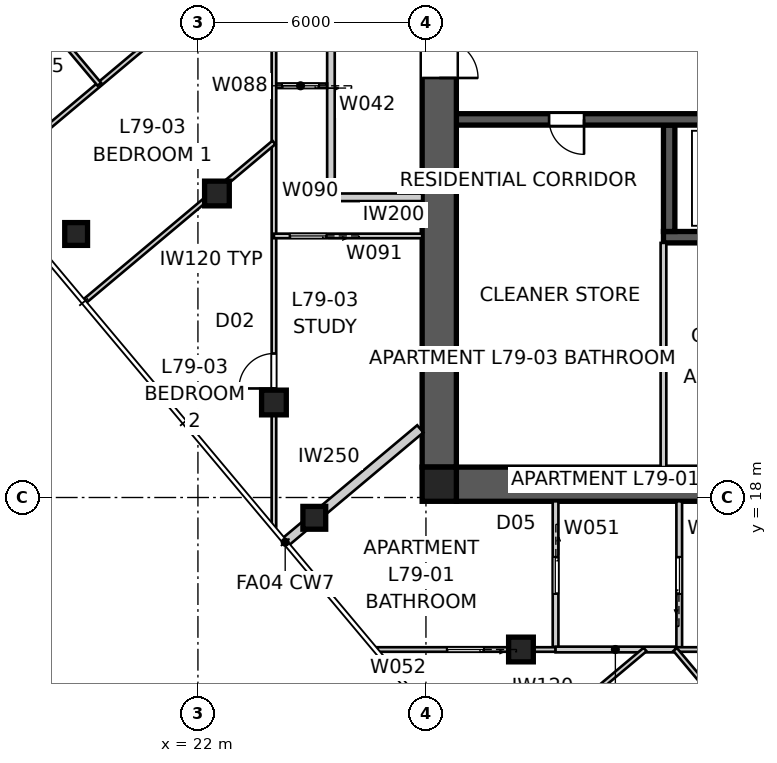
"""IFC4 building model, lengths in metres.
Left out: names, types, materials, properties, quantities, classifications, styles, units other than length and angle.
Written with IfcOpenShell. Run it as: python <this file> out.ifc"""

import sys

from ifc_helpers import new_model, si_unit, direction, frame, frame_2d, origin, origin_2d, place, context, subcontext, project, spatial, polyline, rectangle, outline, extrude, element, fill, save


model = new_model("IFC4")
c1 = context("Model", 3, precision=1e-05, world=origin(), true_north=direction((0.0, 1.0)))
c2 = subcontext(c1, "Body", "Model", "MODEL_VIEW")
j1 = project(units=[si_unit("LENGTHUNIT", "METRE"), si_unit("PLANEANGLEUNIT", "RADIAN")], contexts=[c1])
p1 = place(None, origin())
s1 = spatial("IfcSite", under=j1, at=p1, CompositionType="ELEMENT")
p2 = place(p1, origin())
s2 = spatial("IfcBuilding", under=s1, at=p2, CompositionType="ELEMENT")
p3 = place(p2, frame((0.0, 0.0, 286.2)))
s3 = spatial("IfcBuildingStorey", under=s2, at=p3, CompositionType="ELEMENT", Elevation=286.2)
p4 = place(p3, frame((51.2, 18.35, 0.0), z_axis=(0.0, 0.0, 1.0), x_axis=(-1.0, 0.0, 0.0)))
e1 = element("IfcWall", 1, at=p4, inside=s3, PredefinedType="SHEAR", context=c2, shape_type="SweptSolid", body=[
    extrude(outline(polyline([(0.0, -0.45), (22.4, -0.45), (22.4, -0.025), (22.85, -0.025), (22.85, 0.025), (22.4, 0.025), (22.4, 0.45), (0.0, 0.45), (0.0, 0.025), (-0.45, 0.025), (-0.45, -0.025), (0.0, -0.025), (0.0, -0.45)])), origin(), (0.0, 0.0, 1.0), 3.4),
])
p5 = place(p3, frame((28.35, 41.2, 0.0), z_axis=(0.0, 0.0, 1.0), x_axis=(0.0, -1.0, 0.0)))
e2 = element("IfcWall", 2, at=p5, inside=s3, PredefinedType="SHEAR", context=c2, shape_type="SweptSolid", body=[
    extrude(outline(polyline([(0.0, -0.45), (22.4, -0.45), (22.4, -0.025), (22.85, -0.025), (22.85, 0.025), (22.4, 0.025), (22.4, 0.45), (0.0, 0.45), (0.0, 0.025), (-0.45, 0.025), (-0.45, -0.025), (0.0, -0.025), (0.0, -0.45)])), origin(), (0.0, 0.0, 1.0), 3.4),
])
p6 = place(p5, frame((11.14, 0.0, 0.0)))
e3 = element("IfcOpeningElement", 3, at=p6, cuts=e2, PredefinedType="OPENING", context=c2, shape_type="SweptSolid", body=[
    extrude(rectangle(XDim=1.02, YDim=2.4, at=frame_2d((0.51, 1.2))), frame((0.0, 0.46, 0.0), z_axis=(0.0, -1.0, 0.0), x_axis=(1.0, 0.0, 0.0)), (0.0, 0.0, 1.0), 0.92),
])
p7 = place(p3, frame((51.2, 27.95, 0.0), z_axis=(0.0, 0.0, 1.0), x_axis=(-1.0, 0.0, 0.0)))
e4 = element("IfcWall", 4, at=p7, inside=s3, PredefinedType="SHEAR", context=c2, shape_type="SweptSolid", body=[
    extrude(rectangle(XDim=22.4, YDim=0.3, at=frame_2d((11.2, 0.0))), origin(), (0.0, 0.0, 1.0), 3.4),
])
p8 = place(p7, frame((19.04, 0.0, 0.0)))
e5 = element("IfcOpeningElement", 5, at=p8, cuts=e4, PredefinedType="OPENING", context=c2, shape_type="SweptSolid", body=[
    extrude(rectangle(XDim=0.92, YDim=2.1, at=frame_2d((0.46, 1.05))), frame((0.0, 0.16, 0.0), z_axis=(0.0, -1.0, 0.0), x_axis=(1.0, 0.0, 0.0)), (0.0, 0.0, 1.0), 0.32),
])
p9 = place(p7, frame((1.265, 0.0, 0.0)))
e6 = element("IfcOpeningElement", 6, at=p9, cuts=e4, PredefinedType="OPENING", context=c2, shape_type="SweptSolid", body=[
    extrude(rectangle(XDim=1.02, YDim=2.1, at=frame_2d((0.51, 1.05))), frame((0.0, 0.16, 0.0), z_axis=(0.0, -1.0, 0.0), x_axis=(1.0, 0.0, 0.0)), (0.0, 0.0, 1.0), 0.32),
])
p10 = place(p7, frame((4.015, 0.0, 0.0)))
e7 = element("IfcOpeningElement", 7, at=p10, cuts=e4, PredefinedType="OPENING", context=c2, shape_type="SweptSolid", body=[
    extrude(rectangle(XDim=0.92, YDim=2.1, at=frame_2d((0.46, 1.05))), frame((0.0, 0.16, 0.0), z_axis=(0.0, -1.0, 0.0), x_axis=(1.0, 0.0, 0.0)), (0.0, 0.0, 1.0), 0.32),
])
p11 = place(p7, frame((9.34, 0.0, 0.0)))
e8 = element("IfcOpeningElement", 8, at=p11, cuts=e4, PredefinedType="OPENING", context=c2, shape_type="SweptSolid", body=[
    extrude(rectangle(XDim=0.92, YDim=2.1, at=frame_2d((0.46, 1.05))), frame((0.0, 0.16, 0.0), z_axis=(0.0, -1.0, 0.0), x_axis=(1.0, 0.0, 0.0)), (0.0, 0.0, 1.0), 0.32),
])
p12 = place(p7, frame((7.015, 0.0, 0.0)))
e9 = element("IfcOpeningElement", 9, at=p12, cuts=e4, PredefinedType="OPENING", context=c2, shape_type="SweptSolid", body=[
    extrude(rectangle(XDim=0.92, YDim=2.1, at=frame_2d((0.46, 1.05))), frame((0.0, 0.16, 0.0), z_axis=(0.0, -1.0, 0.0), x_axis=(1.0, 0.0, 0.0)), (0.0, 0.0, 1.0), 0.32),
])
p13 = place(p7, frame((12.05, 0.0, 0.0)))
e10 = element("IfcOpeningElement", 10, at=p13, cuts=e4, PredefinedType="OPENING", context=c2, shape_type="SweptSolid", body=[
    extrude(rectangle(XDim=1.1, YDim=2.1, at=frame_2d((0.55, 1.05))), frame((0.0, 0.16, 0.0), z_axis=(0.0, -1.0, 0.0), x_axis=(1.0, 0.0, 0.0)), (0.0, 0.0, 1.0), 0.32),
])
p14 = place(p7, frame((14.85, 0.0, 0.0)))
e11 = element("IfcOpeningElement", 11, at=p14, cuts=e4, PredefinedType="OPENING", context=c2, shape_type="SweptSolid", body=[
    extrude(rectangle(XDim=1.1, YDim=2.1, at=frame_2d((0.55, 1.05))), frame((0.0, 0.16, 0.0), z_axis=(0.0, -1.0, 0.0), x_axis=(1.0, 0.0, 0.0)), (0.0, 0.0, 1.0), 0.32),
])
p15 = place(p3, frame((45.75, 24.85, 0.0), z_axis=(0.0, 0.0, 1.0), x_axis=(-1.0, 0.0, 0.0)))
e12 = element("IfcWall", 12, at=p15, inside=s3, PredefinedType="SHEAR", context=c2, shape_type="SweptSolid", body=[
    extrude(rectangle(XDim=11.5, YDim=0.3, at=frame_2d((5.75, 0.0))), origin(), (0.0, 0.0, 1.0), 3.4),
])
p16 = place(p3, frame((34.4, 27.8, 0.0), z_axis=(0.0, 0.0, 1.0), x_axis=(0.0, -1.0, 0.0)))
e13 = element("IfcWall", 13, at=p16, inside=s3, PredefinedType="SHEAR", context=c2, shape_type="SweptSolid", body=[
    extrude(rectangle(XDim=2.8, YDim=0.3, at=frame_2d((1.4, 0.0))), origin(), (0.0, 0.0, 1.0), 3.4),
])
p17 = place(p3, frame((28.35, 18.35, 0.0), z_axis=(0.0, 0.0, 1.0), x_axis=(1.0, 0.0, 0.0)))
e14 = element("IfcColumn", 14, at=p17, inside=s3, PredefinedType="COLUMN", context=c2, shape_type="SweptSolid", body=[
    extrude(rectangle(XDim=0.9, YDim=0.9, at=origin_2d()), origin(), (0.0, 0.0, 1.0), 3.4),
])
for number, where, z_axis, x_axis in (
    (15, (18.795, 24.935, 0.0), (0.0, 0.0, 1.0), (1.0, 0.0, 0.0)),
    (16, (25.062, 17.466, 0.0), (0.0, 0.0, 1.0), (1.0, 0.0, 0.0)),
):
    element("IfcColumn", number, at=place(p3, frame(where, z_axis=z_axis, x_axis=x_axis)), inside=s3, PredefinedType="COLUMN", context=c2, shape_type="SweptSolid", body=[
        extrude(rectangle(XDim=0.6, YDim=0.6, at=origin_2d()), origin(), (0.0, 0.0, 1.0), 3.4),
    ])
for number, where, z_axis, x_axis in (
    (17, (22.5, 26.0, 0.0), (0.0, 0.0, 1.0), (1.0, 0.0, 0.0)),
    (18, (24.0, 20.5, 0.0), (0.0, 0.0, 1.0), (1.0, 0.0, 0.0)),
    (19, (30.5, 14.0, 0.0), (0.0, 0.0, 1.0), (1.0, 0.0, 0.0)),
):
    element("IfcColumn", number, at=place(p3, frame(where, z_axis=z_axis, x_axis=x_axis)), inside=s3, PredefinedType="COLUMN", context=c2, shape_type="SweptSolid", body=[
        extrude(rectangle(XDim=0.65, YDim=0.65, at=origin_2d()), origin(), (0.0, 0.0, 1.0), 3.4),
    ])
p18 = place(p3, frame((25.5, 25.9, 0.0), z_axis=(0.0, 0.0, 1.0), x_axis=(0.0, 1.0, 0.0)))
e20 = element("IfcWall", 20, at=p18, inside=s3, PredefinedType="PARTITIONING", context=c2, shape_type="SweptSolid", body=[
    extrude(rectangle(XDim=8.2, YDim=0.2, at=frame_2d((4.1, 0.0))), origin(), (0.0, 0.0, 1.0), 3.25),
])
p19 = place(p18, frame((4.882, 0.0, 0.0)))
e21 = element("IfcOpeningElement", 21, at=p19, cuts=e20, PredefinedType="OPENING", context=c2, shape_type="SweptSolid", body=[
    extrude(rectangle(XDim=1.02, YDim=2.34, at=frame_2d((0.51, 1.17))), frame((0.0, 0.11, 0.0), z_axis=(0.0, -1.0, 0.0), x_axis=(1.0, 0.0, 0.0)), (0.0, 0.0, 1.0), 0.22),
])
p20 = place(p3, frame((27.9, 25.9, 0.0), z_axis=(0.0, 0.0, 1.0), x_axis=(-1.0, 0.0, 0.0)))
e22 = element("IfcWall", 22, at=p20, inside=s3, PredefinedType="PARTITIONING", context=c2, shape_type="SweptSolid", body=[
    extrude(rectangle(XDim=2.5, YDim=0.2, at=frame_2d((1.25, 0.0))), origin(), (0.0, 0.0, 1.0), 3.25),
])
p21 = place(p3, frame((24.296, 16.823, 0.0), z_axis=(0.0, 0.0, 1.0), x_axis=(0.76603440109, 0.64279957712, 0.0)))
e23 = element("IfcWall", 23, at=p21, inside=s3, PredefinedType="PARTITIONING", context=c2, shape_type="SweptSolid", body=[
    extrude(rectangle(XDim=4.64, YDim=0.25, at=frame_2d((2.32, 0.0))), origin(), (0.0, 0.0, 1.0), 3.25),
])
p22 = place(p3, frame((34.25, 18.8, 0.0), z_axis=(0.0, 0.0, 1.0), x_axis=(0.0, 1.0, 0.0)))
e24 = element("IfcWall", 24, at=p22, inside=s3, PredefinedType="SOLIDWALL", context=c2, shape_type="SweptSolid", body=[
    extrude(rectangle(XDim=5.9, YDim=0.15, at=frame_2d((2.95, 0.0))), origin(), (0.0, 0.0, 1.0), 3.25),
])
p23 = place(p3, frame((31.41, 17.9, 0.0), z_axis=(0.0, 0.0, 1.0), x_axis=(0.0, -1.0, 0.0)))
e25 = element("IfcWall", 25, at=p23, inside=s3, PredefinedType="SOLIDWALL", context=c2, shape_type="SweptSolid", body=[
    extrude(rectangle(XDim=3.9, YDim=0.15, at=frame_2d((1.95, 0.0))), origin(), (0.0, 0.0, 1.0), 3.25),
])
p24 = place(p23, frame((1.47, 0.0, 0.0)))
e26 = element("IfcOpeningElement", 26, at=p24, cuts=e25, PredefinedType="OPENING", context=c2, shape_type="SweptSolid", body=[
    extrude(rectangle(XDim=0.96, YDim=2.1, at=frame_2d((0.48, 1.05))), frame((0.0, 0.085, 0.0), z_axis=(0.0, -1.0, 0.0), x_axis=(1.0, 0.0, 0.0)), (0.0, 0.0, 1.0), 0.17),
])
p25 = place(p3, frame((31.41, 14.0, 0.0), z_axis=(0.0, 0.0, 1.0), x_axis=(-1.0, 0.0, 0.0)))
e27 = element("IfcWall", 27, at=p25, inside=s3, PredefinedType="PARTITIONING", context=c2, shape_type="SweptSolid", body=[
    extrude(rectangle(XDim=4.693, YDim=0.12, at=frame_2d((2.347, 0.0))), origin(), (0.0, 0.0, 1.0), 2.55),
])
p26 = place(p25, frame((1.893, 0.0, 0.0)))
e28 = element("IfcOpeningElement", 28, at=p26, cuts=e27, PredefinedType="OPENING", context=c2, shape_type="SweptSolid", body=[
    extrude(rectangle(XDim=0.96, YDim=2.1, at=frame_2d((0.48, 1.05))), frame((0.0, 0.07, 0.0), z_axis=(0.0, -1.0, 0.0), x_axis=(1.0, 0.0, 0.0)), (0.0, 0.0, 1.0), 0.14),
])
p27 = place(p3, frame((34.665, 14.0, 0.0), z_axis=(0.0, 0.0, 1.0), x_axis=(0.0, 1.0, 0.0)))
e29 = element("IfcWall", 29, at=p27, inside=s3, PredefinedType="SOLIDWALL", context=c2, shape_type="SweptSolid", body=[
    extrude(rectangle(XDim=3.9, YDim=0.15, at=frame_2d((1.95, 0.0))), origin(), (0.0, 0.0, 1.0), 3.25),
])
p28 = place(p27, frame((1.47, 0.0, 0.0)))
e30 = element("IfcOpeningElement", 30, at=p28, cuts=e29, PredefinedType="OPENING", context=c2, shape_type="SweptSolid", body=[
    extrude(rectangle(XDim=0.96, YDim=2.1, at=frame_2d((0.48, 1.05))), frame((0.0, 0.085, 0.0), z_axis=(0.0, -1.0, 0.0), x_axis=(1.0, 0.0, 0.0)), (0.0, 0.0, 1.0), 0.17),
])
p29 = place(p3, frame((51.625, 14.0, 0.0), z_axis=(0.0, 0.0, 1.0), x_axis=(-1.0, 0.0, 0.0)))
e31 = element("IfcWall", 31, at=p29, inside=s3, PredefinedType="PARTITIONING", context=c2, shape_type="SweptSolid", body=[
    extrude(rectangle(XDim=17.067, YDim=0.12, at=frame_2d((8.533, 0.0))), origin(), (0.0, 0.0, 1.0), 2.55),
])
p30 = place(p29, frame((2.702, 0.0, 0.0)))
e32 = element("IfcOpeningElement", 32, at=p30, cuts=e31, PredefinedType="OPENING", context=c2, shape_type="SweptSolid", body=[
    extrude(rectangle(XDim=0.92, YDim=2.34, at=frame_2d((0.46, 1.17))), frame((0.0, 0.07, 0.0), z_axis=(0.0, -1.0, 0.0), x_axis=(1.0, 0.0, 0.0)), (0.0, 0.0, 1.0), 0.14),
])
p31 = place(p29, frame((11.4, 0.0, 0.0)))
e33 = element("IfcOpeningElement", 33, at=p31, cuts=e31, PredefinedType="OPENING", context=c2, shape_type="SweptSolid", body=[
    extrude(rectangle(XDim=0.92, YDim=2.34, at=frame_2d((0.46, 1.17))), frame((0.0, 0.07, 0.0), z_axis=(0.0, -1.0, 0.0), x_axis=(1.0, 0.0, 0.0)), (0.0, 0.0, 1.0), 0.14),
])
p32 = place(p29, frame((14.544, 0.0, 0.0)))
e34 = element("IfcOpeningElement", 34, at=p32, cuts=e31, PredefinedType="OPENING", context=c2, shape_type="SweptSolid", body=[
    extrude(rectangle(XDim=0.96, YDim=2.1, at=frame_2d((0.48, 1.05))), frame((0.0, 0.07, 0.0), z_axis=(0.0, -1.0, 0.0), x_axis=(1.0, 0.0, 0.0)), (0.0, 0.0, 1.0), 0.14),
])
p33 = place(p3, frame((34.558, 14.0, 0.0), z_axis=(0.0, 0.0, 1.0), x_axis=(-1.0, 0.0, 0.0)))
e35 = element("IfcWall", 35, at=p33, inside=s3, PredefinedType="SOLIDWALL", context=c2, shape_type="SweptSolid", body=[
    extrude(rectangle(XDim=3.147, YDim=0.15, at=frame_2d((1.574, 0.0))), origin(), (0.0, 0.0, 1.0), 3.25),
])
p34 = place(p3, frame((34.558, 14.0, 0.0), z_axis=(0.0, 0.0, 1.0), x_axis=(0.642782931909, -0.766048368216, 0.0)))
e36 = element("IfcWall", 36, at=p34, inside=s3, PredefinedType="PARTITIONING", context=c2, shape_type="SweptSolid", body=[
    extrude(rectangle(XDim=11.701, YDim=0.12, at=frame_2d((5.851, 0.0))), origin(), (0.0, 0.0, 1.0), 3.25),
])
p35 = place(p34, frame((5.411, 0.0, 0.0)))
e37 = element("IfcOpeningElement", 37, at=p35, cuts=e36, PredefinedType="OPENING", context=c2, shape_type="SweptSolid", body=[
    extrude(rectangle(XDim=0.92, YDim=2.34, at=frame_2d((0.46, 1.17))), frame((0.0, 0.07, 0.0), z_axis=(0.0, -1.0, 0.0), x_axis=(1.0, 0.0, 0.0)), (0.0, 0.0, 1.0), 0.14),
])
p36 = place(p3, frame((29.63, 10.529, 0.0), z_axis=(0.0, 0.0, 1.0), x_axis=(0.766034275706, 0.642799726543, 0.0)))
e38 = element("IfcWall", 38, at=p36, inside=s3, PredefinedType="PARTITIONING", context=c2, shape_type="SweptSolid", body=[
    extrude(rectangle(XDim=5.4, YDim=0.12, at=frame_2d((2.7, 0.0))), origin(), (0.0, 0.0, 1.0), 3.25),
])
p37 = place(p3, frame((25.4, 28.834, 0.0), z_axis=(0.0, 0.0, 1.0), x_axis=(-1.0, 0.0, 0.0)))
e39 = element("IfcWall", 39, at=p37, inside=s3, PredefinedType="PARTITIONING", context=c2, shape_type="SweptSolid", body=[
    extrude(rectangle(XDim=1.4, YDim=0.12, at=frame_2d((0.7, 0.0))), origin(), (0.0, 0.0, 1.0), 3.25),
])
p38 = place(p37, frame((0.22, 0.0, 0.0)))
e40 = element("IfcOpeningElement", 40, at=p38, cuts=e39, PredefinedType="OPENING", context=c2, shape_type="SweptSolid", body=[
    extrude(rectangle(XDim=0.96, YDim=2.1, at=frame_2d((0.48, 1.05))), frame((0.0, 0.07, 0.0), z_axis=(0.0, -1.0, 0.0), x_axis=(1.0, 0.0, 0.0)), (0.0, 0.0, 1.0), 0.14),
])
p39 = place(p3, frame((24.0, 17.238, 0.0), z_axis=(0.0, 0.0, 1.0), x_axis=(0.0, 1.0, 0.0)))
e41 = element("IfcWall", 41, at=p39, inside=s3, PredefinedType="PARTITIONING", context=c2, shape_type="SweptSolid", body=[
    extrude(rectangle(XDim=26.045, YDim=0.12, at=frame_2d((13.022, 0.0))), origin(), (0.0, 0.0, 1.0), 2.55),
])
p40 = place(p39, frame((13.116, 0.0, 0.0)))
e42 = element("IfcOpeningElement", 42, at=p40, cuts=e41, PredefinedType="OPENING", context=c2, shape_type="SweptSolid", body=[
    extrude(rectangle(XDim=0.92, YDim=2.34, at=frame_2d((0.46, 1.17))), frame((0.0, 0.07, 0.0), z_axis=(0.0, -1.0, 0.0), x_axis=(1.0, 0.0, 0.0)), (0.0, 0.0, 1.0), 0.14),
])
p41 = place(p39, frame((15.705, 0.0, 0.0)))
e43 = element("IfcOpeningElement", 43, at=p41, cuts=e41, PredefinedType="OPENING", context=c2, shape_type="SweptSolid", body=[
    extrude(rectangle(XDim=0.92, YDim=2.34, at=frame_2d((0.46, 1.17))), frame((0.0, 0.07, 0.0), z_axis=(0.0, -1.0, 0.0), x_axis=(1.0, 0.0, 0.0)), (0.0, 0.0, 1.0), 0.14),
])
p42 = place(p39, frame((20.191, 0.0, 0.0)))
e44 = element("IfcOpeningElement", 44, at=p42, cuts=e41, PredefinedType="OPENING", context=c2, shape_type="SweptSolid", body=[
    extrude(rectangle(XDim=0.96, YDim=2.1, at=frame_2d((0.48, 1.05))), frame((0.0, 0.07, 0.0), z_axis=(0.0, -1.0, 0.0), x_axis=(1.0, 0.0, 0.0)), (0.0, 0.0, 1.0), 0.14),
])
p43 = place(p39, frame((3.631, 0.0, 0.0)))
e45 = element("IfcOpeningElement", 45, at=p43, cuts=e41, PredefinedType="OPENING", context=c2, shape_type="SweptSolid", body=[
    extrude(rectangle(XDim=0.92, YDim=2.34, at=frame_2d((0.46, 1.17))), frame((0.0, 0.07, 0.0), z_axis=(0.0, -1.0, 0.0), x_axis=(1.0, 0.0, 0.0)), (0.0, 0.0, 1.0), 0.14),
])
p44 = place(p3, frame((27.9, 24.883, 0.0), z_axis=(0.0, 0.0, 1.0), x_axis=(-1.0, 0.0, 0.0)))
e46 = element("IfcWall", 46, at=p44, inside=s3, PredefinedType="PARTITIONING", context=c2, shape_type="SweptSolid", body=[
    extrude(rectangle(XDim=3.9, YDim=0.12, at=frame_2d((1.95, 0.0))), origin(), (0.0, 0.0, 1.0), 3.25),
])
p45 = place(p44, frame((2.52, 0.0, 0.0)))
e47 = element("IfcOpeningElement", 47, at=p45, cuts=e46, PredefinedType="OPENING", context=c2, shape_type="SweptSolid", body=[
    extrude(rectangle(XDim=0.96, YDim=2.1, at=frame_2d((0.48, 1.05))), frame((0.0, 0.07, 0.0), z_axis=(0.0, -1.0, 0.0), x_axis=(1.0, 0.0, 0.0)), (0.0, 0.0, 1.0), 0.14),
])
p46 = place(p3, frame((24.0, 32.729, 0.0), z_axis=(0.0, 0.0, 1.0), x_axis=(-0.766044319693, -0.64278775678, 0.0)))
e48 = element("IfcWall", 48, at=p46, inside=s3, PredefinedType="PARTITIONING", context=c2, shape_type="SweptSolid", body=[
    extrude(rectangle(XDim=9.957, YDim=0.12, at=frame_2d((4.979, 0.0))), origin(), (0.0, 0.0, 1.0), 3.25),
])
p47 = place(p3, frame((19.406, 28.874, 0.0), z_axis=(0.0, 0.0, 1.0), x_axis=(-0.642767300664, 0.766061483953, 0.0)))
e49 = element("IfcWall", 49, at=p47, inside=s3, PredefinedType="PARTITIONING", context=c2, shape_type="SweptSolid", body=[
    extrude(rectangle(XDim=4.085, YDim=0.12, at=frame_2d((2.042, 0.0))), origin(), (0.0, 0.0, 1.0), 3.25),
])
p48 = place(p47, frame((2.853, 0.0, 0.0)))
e50 = element("IfcOpeningElement", 50, at=p48, cuts=e49, PredefinedType="OPENING", context=c2, shape_type="SweptSolid", body=[
    extrude(rectangle(XDim=0.92, YDim=2.34, at=frame_2d((0.46, 1.17))), frame((0.0, 0.07, 0.0), z_axis=(0.0, -1.0, 0.0), x_axis=(1.0, 0.0, 0.0)), (0.0, 0.0, 1.0), 0.14),
])
p49 = place(p3, frame((24.0, 27.344, 0.0), z_axis=(0.0, 0.0, 1.0), x_axis=(-0.766051249233, -0.642779498388, 0.0)))
e51 = element("IfcWall", 51, at=p49, inside=s3, PredefinedType="PARTITIONING", context=c2, shape_type="SweptSolid", body=[
    extrude(rectangle(XDim=6.496, YDim=0.12, at=frame_2d((3.248, 0.0))), origin(), (0.0, 0.0, 1.0), 3.25),
])
p50 = place(p8, origin())
e52 = element("IfcDoor", 52, at=p50, inside=s3, OperationType="SINGLE_SWING_LEFT", PredefinedType="DOOR", context=c2, shape_type="SweptSolid", body=[
    extrude(rectangle(XDim=0.92, YDim=2.1, at=frame_2d((0.46, 1.05))), frame((0.0, 0.025, 0.0), z_axis=(0.0, -1.0, 0.0), x_axis=(1.0, 0.0, 0.0)), (0.0, 0.0, 1.0), 0.05),
])
fill(e5, e52)
p51 = place(p38, origin())
e53 = element("IfcDoor", 53, at=p51, inside=s3, OperationType="SLIDING_TO_LEFT", PredefinedType="DOOR", context=c2, shape_type="SweptSolid", body=[
    extrude(rectangle(XDim=0.96, YDim=2.1, at=frame_2d((0.48, 1.05))), frame((0.0, 0.025, 0.0), z_axis=(0.0, -1.0, 0.0), x_axis=(1.0, 0.0, 0.0)), (0.0, 0.0, 1.0), 0.05),
])
fill(e40, e53)
p52 = place(p45, origin())
e54 = element("IfcDoor", 54, at=p52, inside=s3, OperationType="SLIDING_TO_LEFT", PredefinedType="DOOR", context=c2, shape_type="SweptSolid", body=[
    extrude(rectangle(XDim=0.96, YDim=2.1, at=frame_2d((0.48, 1.05))), frame((0.0, 0.025, 0.0), z_axis=(0.0, -1.0, 0.0), x_axis=(1.0, 0.0, 0.0)), (0.0, 0.0, 1.0), 0.05),
])
fill(e47, e54)
p53 = place(p43, origin())
e55 = element("IfcDoor", 55, at=p53, inside=s3, OperationType="SINGLE_SWING_LEFT", PredefinedType="DOOR", context=c2, shape_type="SweptSolid", body=[
    extrude(rectangle(XDim=0.92, YDim=2.34, at=frame_2d((0.46, 1.17))), frame((0.0, 0.025, 0.0), z_axis=(0.0, -1.0, 0.0), x_axis=(1.0, 0.0, 0.0)), (0.0, 0.0, 1.0), 0.05),
])
fill(e45, e55)
p54 = place(p28, origin())
e56 = element("IfcDoor", 56, at=p54, inside=s3, OperationType="SLIDING_TO_LEFT", PredefinedType="DOOR", context=c2, shape_type="SweptSolid", body=[
    extrude(rectangle(XDim=0.96, YDim=2.1, at=frame_2d((0.48, 1.05))), frame((0.0, 0.025, 0.0), z_axis=(0.0, -1.0, 0.0), x_axis=(1.0, 0.0, 0.0)), (0.0, 0.0, 1.0), 0.05),
])
fill(e30, e56)
p55 = place(p24, origin())
e57 = element("IfcDoor", 57, at=p55, inside=s3, OperationType="SLIDING_TO_LEFT", PredefinedType="DOOR", context=c2, shape_type="SweptSolid", body=[
    extrude(rectangle(XDim=0.96, YDim=2.1, at=frame_2d((0.48, 1.05))), frame((0.0, 0.025, 0.0), z_axis=(0.0, -1.0, 0.0), x_axis=(1.0, 0.0, 0.0)), (0.0, 0.0, 1.0), 0.05),
])
fill(e26, e57)
p56 = place(p26, origin())
e58 = element("IfcDoor", 58, at=p56, inside=s3, OperationType="SLIDING_TO_LEFT", PredefinedType="DOOR", context=c2, shape_type="SweptSolid", body=[
    extrude(rectangle(XDim=0.96, YDim=2.1, at=frame_2d((0.48, 1.05))), frame((0.0, 0.025, 0.0), z_axis=(0.0, -1.0, 0.0), x_axis=(1.0, 0.0, 0.0)), (0.0, 0.0, 1.0), 0.05),
])
fill(e28, e58)
p57 = place(p6, origin())
e59 = element("IfcDoor", 59, at=p57, inside=s3, OperationType="SINGLE_SWING_RIGHT", PredefinedType="DOOR", context=c2, shape_type="SweptSolid", body=[
    extrude(rectangle(XDim=1.02, YDim=2.4, at=frame_2d((0.51, 1.2))), frame((0.0, 0.025, 0.0), z_axis=(0.0, -1.0, 0.0), x_axis=(1.0, 0.0, 0.0)), (0.0, 0.0, 1.0), 0.05),
])
fill(e3, e59)
save(model, sys.argv[1])
